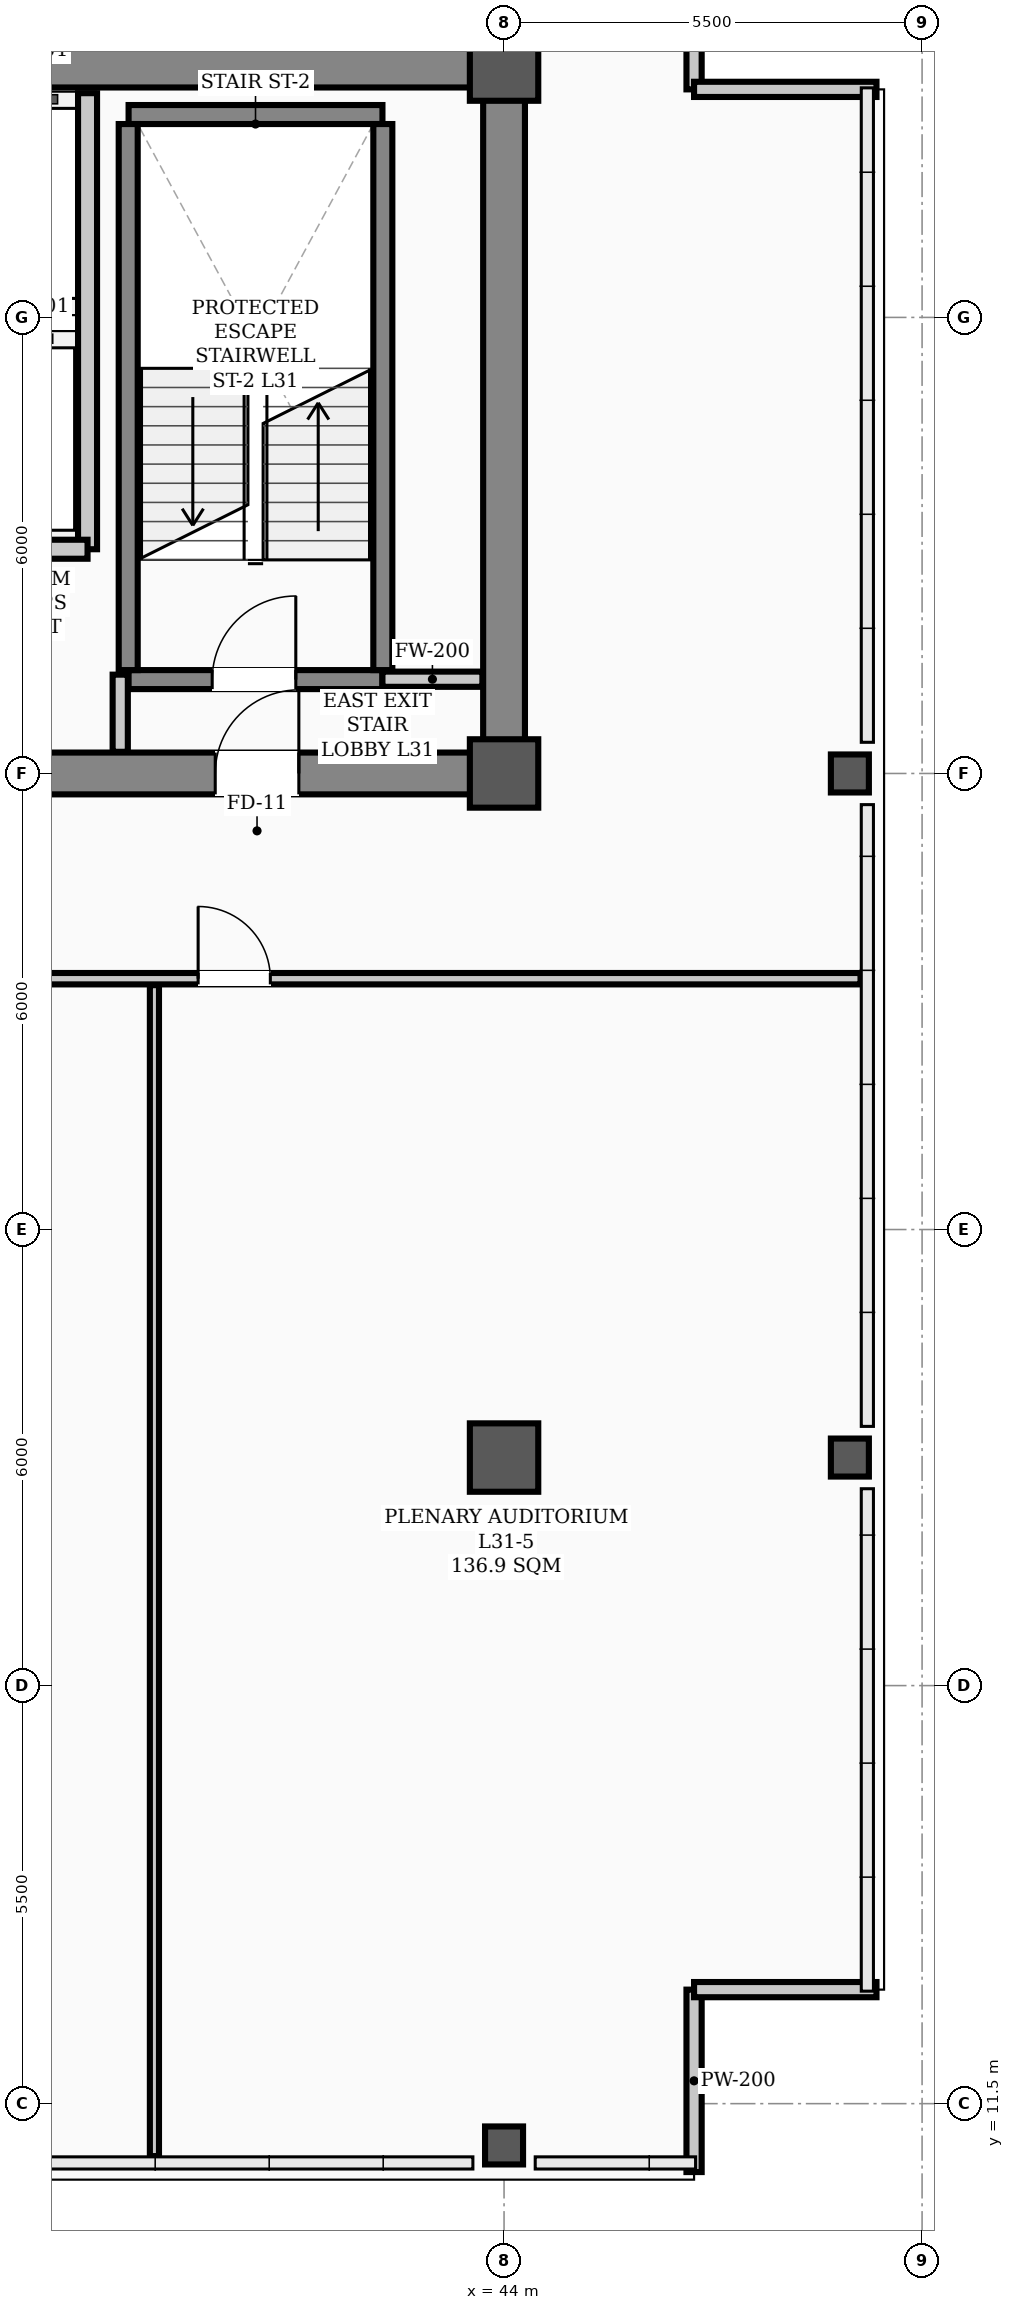
"""IFC4 building model, lengths in metres.
Left out: names, types, materials, properties, quantities, classifications, styles, units other than length and angle.
Written with IfcOpenShell. Run it as: python <this file> out.ifc"""

import sys

from ifc_helpers import new_model, si_unit, direction, frame, frame_2d, origin, origin_2d, place, context, subcontext, project, spatial, rectangle, hollow_rectangle, extrude, element, fill, save


model = new_model("IFC4")
c1 = context("Model", 3, precision=1e-05, world=origin(), true_north=direction((0.0, 1.0)))
c2 = subcontext(c1, "Body", "Model", "MODEL_VIEW")
j1 = project(units=[si_unit("LENGTHUNIT", "METRE"), si_unit("PLANEANGLEUNIT", "RADIAN")], contexts=[c1])
p1 = place(None, origin())
s1 = spatial("IfcSite", under=j1, at=p1, CompositionType="ELEMENT")
p2 = place(p1, origin())
s2 = spatial("IfcBuilding", under=s1, at=p2, CompositionType="ELEMENT")
p3 = place(p2, frame((0.0, 0.0, 126.6)))
s3 = spatial("IfcBuildingStorey", under=s2, at=p3, CompositionType="ELEMENT", Elevation=126.6)
for number, where, z_axis, x_axis in (
    (1, (44.0, 29.0, 0.0), (0.0, 0.0, 1.0), (1.0, 0.0, 0.0)),
    (2, (44.0, 38.3, 0.0), (0.0, 0.0, 1.0), (1.0, 0.0, 0.0)),
    (3, (44.0, 20.0, 0.0), (0.0, 0.0, 1.0), (1.0, 0.0, 0.0)),
):
    element("IfcColumn", number, at=place(p3, frame(where, z_axis=z_axis, x_axis=x_axis)), inside=s3, PredefinedType="COLUMN", context=c2, shape_type="SweptSolid", body=[
        extrude(hollow_rectangle(XDim=0.9, YDim=0.9, WallThickness=0.035, InnerFilletRadius=0.017, OuterFilletRadius=0.052, at=origin_2d()), origin(), (0.0, 0.0, 1.0), 3.9),
    ])
for number, where, z_axis, x_axis in (
    (4, (44.0, 10.95, 0.0), (0.0, 0.0, 1.0), (1.0, 0.0, 0.0)),
    (5, (48.55, 20.0, 0.0), (0.0, 0.0, 1.0), (1.0, 0.0, 0.0)),
    (6, (48.55, 29.0, 0.0), (0.0, 0.0, 1.0), (1.0, 0.0, 0.0)),
):
    element("IfcColumn", number, at=place(p3, frame(where, z_axis=z_axis, x_axis=x_axis)), inside=s3, PredefinedType="COLUMN", context=c2, shape_type="SweptSolid", body=[
        extrude(hollow_rectangle(XDim=0.5, YDim=0.5, WallThickness=0.024, InnerFilletRadius=0.012, OuterFilletRadius=0.036, at=origin_2d()), origin(), (0.0, 0.0, 1.0), 3.9),
    ])
for number, where, z_axis, x_axis in (
    (7, (46.5, 10.6, 0.0), (0.0, 0.0, 1.0), (0.0, 1.0, 0.0)),
    (8, (46.5, 13.0, 0.0), (0.0, 0.0, 1.0), (1.0, 0.0, 0.0)),
    (9, (46.5, 40.4, 0.0), (0.0, 0.0, 1.0), (0.0, -1.0, 0.0)),
    (10, (46.5, 38.0, 0.0), (0.0, 0.0, 1.0), (1.0, 0.0, 0.0)),
):
    element("IfcWall", number, at=place(p3, frame(where, z_axis=z_axis, x_axis=x_axis)), inside=s3, PredefinedType="PARAPET", context=c2, shape_type="SweptSolid", body=[
        extrude(rectangle(XDim=2.4, YDim=0.2, at=frame_2d((1.2, 0.0))), origin(), (0.0, 0.0, 1.0), 1.2),
    ])
p4 = place(p3, frame((13.5, 29.0, 0.0), z_axis=(0.0, 0.0, 1.0), x_axis=(1.0, 0.0, 0.0)))
e11 = element("IfcWall", 11, at=p4, inside=s3, PredefinedType="SHEAR", context=c2, shape_type="SweptSolid", body=[
    extrude(rectangle(XDim=30.5, YDim=0.55, at=frame_2d((15.25, 0.0))), origin(), (0.0, 0.0, 1.0), 3.72),
])
p5 = place(p4, frame((1.75, 0.0, 0.0)))
e12 = element("IfcOpeningElement", 12, at=p5, cuts=e11, PredefinedType="OPENING", context=c2, shape_type="SweptSolid", body=[
    extrude(rectangle(XDim=1.1, YDim=2.08, at=frame_2d((0.55, 1.04))), frame((0.0, 0.285, 0.0), z_axis=(0.0, -1.0, 0.0), x_axis=(1.0, 0.0, 0.0)), (0.0, 0.0, 1.0), 0.57),
])
p6 = place(p4, frame((26.7, 0.0, 0.0)))
e13 = element("IfcOpeningElement", 13, at=p6, cuts=e11, PredefinedType="OPENING", context=c2, shape_type="SweptSolid", body=[
    extrude(rectangle(XDim=1.1, YDim=2.08, at=frame_2d((0.55, 1.04))), frame((0.0, 0.285, 0.0), z_axis=(0.0, -1.0, 0.0), x_axis=(1.0, 0.0, 0.0)), (0.0, 0.0, 1.0), 0.57),
])
p7 = place(p4, frame((6.8, 0.0, 0.0)))
e14 = element("IfcOpeningElement", 14, at=p7, cuts=e11, PredefinedType="OPENING", context=c2, shape_type="SweptSolid", body=[
    extrude(rectangle(XDim=1.1, YDim=2.08, at=frame_2d((0.55, 1.04))), frame((0.0, 0.285, 0.0), z_axis=(0.0, -1.0, 0.0), x_axis=(1.0, 0.0, 0.0)), (0.0, 0.0, 1.0), 0.57),
])
p8 = place(p4, frame((13.2, 0.0, 0.0)))
e15 = element("IfcOpeningElement", 15, at=p8, cuts=e11, PredefinedType="OPENING", context=c2, shape_type="SweptSolid", body=[
    extrude(rectangle(XDim=1.6, YDim=2.08, at=frame_2d((0.8, 1.04))), frame((0.0, 0.285, 0.0), z_axis=(0.0, -1.0, 0.0), x_axis=(1.0, 0.0, 0.0)), (0.0, 0.0, 1.0), 0.57),
])
p9 = place(p4, frame((19.6, 0.0, 0.0)))
e16 = element("IfcOpeningElement", 16, at=p9, cuts=e11, PredefinedType="OPENING", context=c2, shape_type="SweptSolid", body=[
    extrude(rectangle(XDim=0.9, YDim=2.08, at=frame_2d((0.45, 1.04))), frame((0.0, 0.285, 0.0), z_axis=(0.0, -1.0, 0.0), x_axis=(1.0, 0.0, 0.0)), (0.0, 0.0, 1.0), 0.57),
])
p10 = place(p4, frame((21.6, 0.0, 0.0)))
e17 = element("IfcOpeningElement", 17, at=p10, cuts=e11, PredefinedType="OPENING", context=c2, shape_type="SweptSolid", body=[
    extrude(rectangle(XDim=0.9, YDim=2.08, at=frame_2d((0.45, 1.04))), frame((0.0, 0.285, 0.0), z_axis=(0.0, -1.0, 0.0), x_axis=(1.0, 0.0, 0.0)), (0.0, 0.0, 1.0), 0.57),
])
p11 = place(p3, frame((13.5, 38.3, 0.0), z_axis=(0.0, 0.0, 1.0), x_axis=(1.0, 0.0, 0.0)))
e18 = element("IfcWall", 18, at=p11, inside=s3, PredefinedType="SHEAR", context=c2, shape_type="SweptSolid", body=[
    extrude(rectangle(XDim=30.5, YDim=0.55, at=frame_2d((15.25, 0.0))), origin(), (0.0, 0.0, 1.0), 3.72),
])
p12 = place(p3, frame((44.0, 29.35, 0.0), z_axis=(0.0, 0.0, 1.0), x_axis=(0.0, 1.0, 0.0)))
e19 = element("IfcWall", 19, at=p12, inside=s3, PredefinedType="SHEAR", context=c2, shape_type="SweptSolid", body=[
    extrude(rectangle(XDim=8.6, YDim=0.55, at=frame_2d((4.3, 0.0))), origin(), (0.0, 0.0, 1.0), 3.72),
])
p13 = place(p3, frame((39.06, 30.235, 0.0), z_axis=(0.0, 0.0, 1.0), x_axis=(1.0, 0.0, 0.0)))
e20 = element("IfcWall", 20, at=p13, inside=s3, PredefinedType="STANDARD", context=c2, shape_type="SweptSolid", body=[
    extrude(rectangle(XDim=3.34, YDim=0.25, at=frame_2d((1.67, 0.0))), origin(), (0.0, 0.0, 1.0), 3.72),
])
p14 = place(p13, frame((1.1, 0.0, 0.0)))
e21 = element("IfcOpeningElement", 21, at=p14, cuts=e20, PredefinedType="OPENING", context=c2, shape_type="SweptSolid", body=[
    extrude(rectangle(XDim=1.1, YDim=2.08, at=frame_2d((0.55, 1.04))), frame((0.0, 0.135, 0.0), z_axis=(0.0, -1.0, 0.0), x_axis=(1.0, 0.0, 0.0)), (0.0, 0.0, 1.0), 0.27),
])
p15 = place(p3, frame((39.06, 37.669, 0.0), z_axis=(0.0, 0.0, 1.0), x_axis=(1.0, 0.0, 0.0)))
e22 = element("IfcWall", 22, at=p15, inside=s3, PredefinedType="STANDARD", context=c2, shape_type="SweptSolid", body=[
    extrude(rectangle(XDim=3.34, YDim=0.25, at=frame_2d((1.67, 0.0))), origin(), (0.0, 0.0, 1.0), 3.72),
])
for number, where, z_axis, x_axis in (
    (23, (39.055, 30.36, 0.0), (0.0, 0.0, 1.0), (0.0, 1.0, 0.0)),
    (24, (42.405, 30.36, 0.0), (0.0, 0.0, 1.0), (0.0, 1.0, 0.0)),
):
    element("IfcWall", number, at=place(p3, frame(where, z_axis=z_axis, x_axis=x_axis)), inside=s3, PredefinedType="STANDARD", context=c2, shape_type="SweptSolid", body=[
        extrude(rectangle(XDim=7.184, YDim=0.25, at=frame_2d((3.592, 0.0))), origin(), (0.0, 0.0, 1.0), 3.72),
    ])
p16 = place(p3, frame((38.52, 31.95, 0.0), z_axis=(0.0, 0.0, 1.0), x_axis=(0.0, 1.0, 0.0)))
e25 = element("IfcWall", 25, at=p16, inside=s3, PredefinedType="STANDARD", context=c2, shape_type="SweptSolid", body=[
    extrude(rectangle(XDim=6.0, YDim=0.25, at=frame_2d((3.0, 0.0))), origin(), (0.0, 0.0, 1.0), 3.48),
])
p17 = place(p3, frame((36.62, 31.95, 0.0), z_axis=(0.0, 0.0, 1.0), x_axis=(1.0, 0.0, 0.0)))
e26 = element("IfcWall", 26, at=p17, inside=s3, PredefinedType="STANDARD", context=c2, shape_type="SweptSolid", body=[
    extrude(rectangle(XDim=1.9, YDim=0.25, at=frame_2d((0.95, 0.0))), origin(), (0.0, 0.0, 1.0), 3.48),
])
p18 = place(p3, frame((42.4, 30.24, 0.0), z_axis=(0.0, 0.0, 1.0), x_axis=(1.0, 0.0, 0.0)))
e27 = element("IfcWall", 27, at=p18, inside=s3, PredefinedType="STANDARD", context=c2, shape_type="SweptSolid", body=[
    extrude(rectangle(XDim=1.315, YDim=0.2, at=frame_2d((0.658, 0.0))), origin(), (0.0, 0.0, 1.0), 3.1),
])
p19 = place(p3, frame((2.31, 26.3, 0.0), z_axis=(0.0, 0.0, 1.0), x_axis=(1.0, 0.0, 0.0)))
e28 = element("IfcWall", 28, at=p19, inside=s3, PredefinedType="PARTITIONING", context=c2, shape_type="SweptSolid", body=[
    extrude(rectangle(XDim=46.38, YDim=0.15, at=frame_2d((23.19, 0.0))), origin(), (0.0, 0.0, 1.0), 3.1),
])
p20 = place(p19, frame((10.19, 0.0, 0.0)))
e29 = element("IfcOpeningElement", 29, at=p20, cuts=e28, PredefinedType="OPENING", context=c2, shape_type="SweptSolid", body=[
    extrude(rectangle(XDim=0.95, YDim=2.08, at=frame_2d((0.475, 1.04))), frame((0.0, 0.085, 0.0), z_axis=(0.0, -1.0, 0.0), x_axis=(1.0, 0.0, 0.0)), (0.0, 0.0, 1.0), 0.17),
])
p21 = place(p19, frame((15.915, 0.0, 0.0)))
e30 = element("IfcOpeningElement", 30, at=p21, cuts=e28, PredefinedType="OPENING", context=c2, shape_type="SweptSolid", body=[
    extrude(rectangle(XDim=0.95, YDim=2.08, at=frame_2d((0.475, 1.04))), frame((0.0, 0.085, 0.0), z_axis=(0.0, -1.0, 0.0), x_axis=(1.0, 0.0, 0.0)), (0.0, 0.0, 1.0), 0.17),
])
p22 = place(p19, frame((24.115, 0.0, 0.0)))
e31 = element("IfcOpeningElement", 31, at=p22, cuts=e28, PredefinedType="OPENING", context=c2, shape_type="SweptSolid", body=[
    extrude(rectangle(XDim=0.95, YDim=2.08, at=frame_2d((0.475, 1.04))), frame((0.0, 0.085, 0.0), z_axis=(0.0, -1.0, 0.0), x_axis=(1.0, 0.0, 0.0)), (0.0, 0.0, 1.0), 0.17),
])
p23 = place(p19, frame((32.515, 0.0, 0.0)))
e32 = element("IfcOpeningElement", 32, at=p23, cuts=e28, PredefinedType="OPENING", context=c2, shape_type="SweptSolid", body=[
    extrude(rectangle(XDim=0.95, YDim=2.08, at=frame_2d((0.475, 1.04))), frame((0.0, 0.085, 0.0), z_axis=(0.0, -1.0, 0.0), x_axis=(1.0, 0.0, 0.0)), (0.0, 0.0, 1.0), 0.17),
])
p24 = place(p19, frame((37.665, 0.0, 0.0)))
e33 = element("IfcOpeningElement", 33, at=p24, cuts=e28, PredefinedType="OPENING", context=c2, shape_type="SweptSolid", body=[
    extrude(rectangle(XDim=0.95, YDim=2.08, at=frame_2d((0.475, 1.04))), frame((0.0, 0.085, 0.0), z_axis=(0.0, -1.0, 0.0), x_axis=(1.0, 0.0, 0.0)), (0.0, 0.0, 1.0), 0.17),
])
p25 = place(p3, frame((38.95, 29.285, 0.0), z_axis=(0.0, 0.0, 1.0), x_axis=(0.0, 1.0, 0.0)))
e34 = element("IfcWall", 34, at=p25, inside=s3, PredefinedType="STANDARD", context=c2, shape_type="SweptSolid", body=[
    extrude(rectangle(XDim=1.015, YDim=0.2, at=frame_2d((0.508, 0.0))), origin(), (0.0, 0.0, 1.0), 3.3),
])
p26 = place(p3, frame((39.4, 10.81, 0.0), z_axis=(0.0, 0.0, 1.0), x_axis=(0.0, 1.0, 0.0)))
e35 = element("IfcWall", 35, at=p26, inside=s3, PredefinedType="PARTITIONING", context=c2, shape_type="SweptSolid", body=[
    extrude(rectangle(XDim=15.405, YDim=0.12, at=frame_2d((7.703, 0.0))), origin(), (0.0, 0.0, 1.0), 3.0),
])
p27 = place(p14, origin())
e36 = element("IfcDoor", 36, at=p27, inside=s3, OperationType="SINGLE_SWING_RIGHT", PredefinedType="DOOR", context=c2, shape_type="SweptSolid", body=[
    extrude(rectangle(XDim=1.1, YDim=2.08, at=frame_2d((0.55, 1.04))), frame((0.0, 0.025, 0.0), z_axis=(0.0, -1.0, 0.0), x_axis=(1.0, 0.0, 0.0)), (0.0, 0.0, 1.0), 0.05),
])
fill(e21, e36)
p28 = place(p6, origin())
e37 = element("IfcDoor", 37, at=p28, inside=s3, OperationType="SINGLE_SWING_RIGHT", PredefinedType="DOOR", context=c2, shape_type="SweptSolid", body=[
    extrude(rectangle(XDim=1.1, YDim=2.08, at=frame_2d((0.55, 1.04))), frame((0.0, 0.025, 0.0), z_axis=(0.0, -1.0, 0.0), x_axis=(1.0, 0.0, 0.0)), (0.0, 0.0, 1.0), 0.05),
])
fill(e13, e37)
p29 = place(p24, origin())
e38 = element("IfcDoor", 38, at=p29, inside=s3, OperationType="SINGLE_SWING_LEFT", PredefinedType="DOOR", context=c2, shape_type="SweptSolid", body=[
    extrude(rectangle(XDim=0.95, YDim=2.08, at=frame_2d((0.475, 1.04))), frame((0.0, 0.025, 0.0), z_axis=(0.0, -1.0, 0.0), x_axis=(1.0, 0.0, 0.0)), (0.0, 0.0, 1.0), 0.05),
])
fill(e33, e38)
save(model, sys.argv[1])
